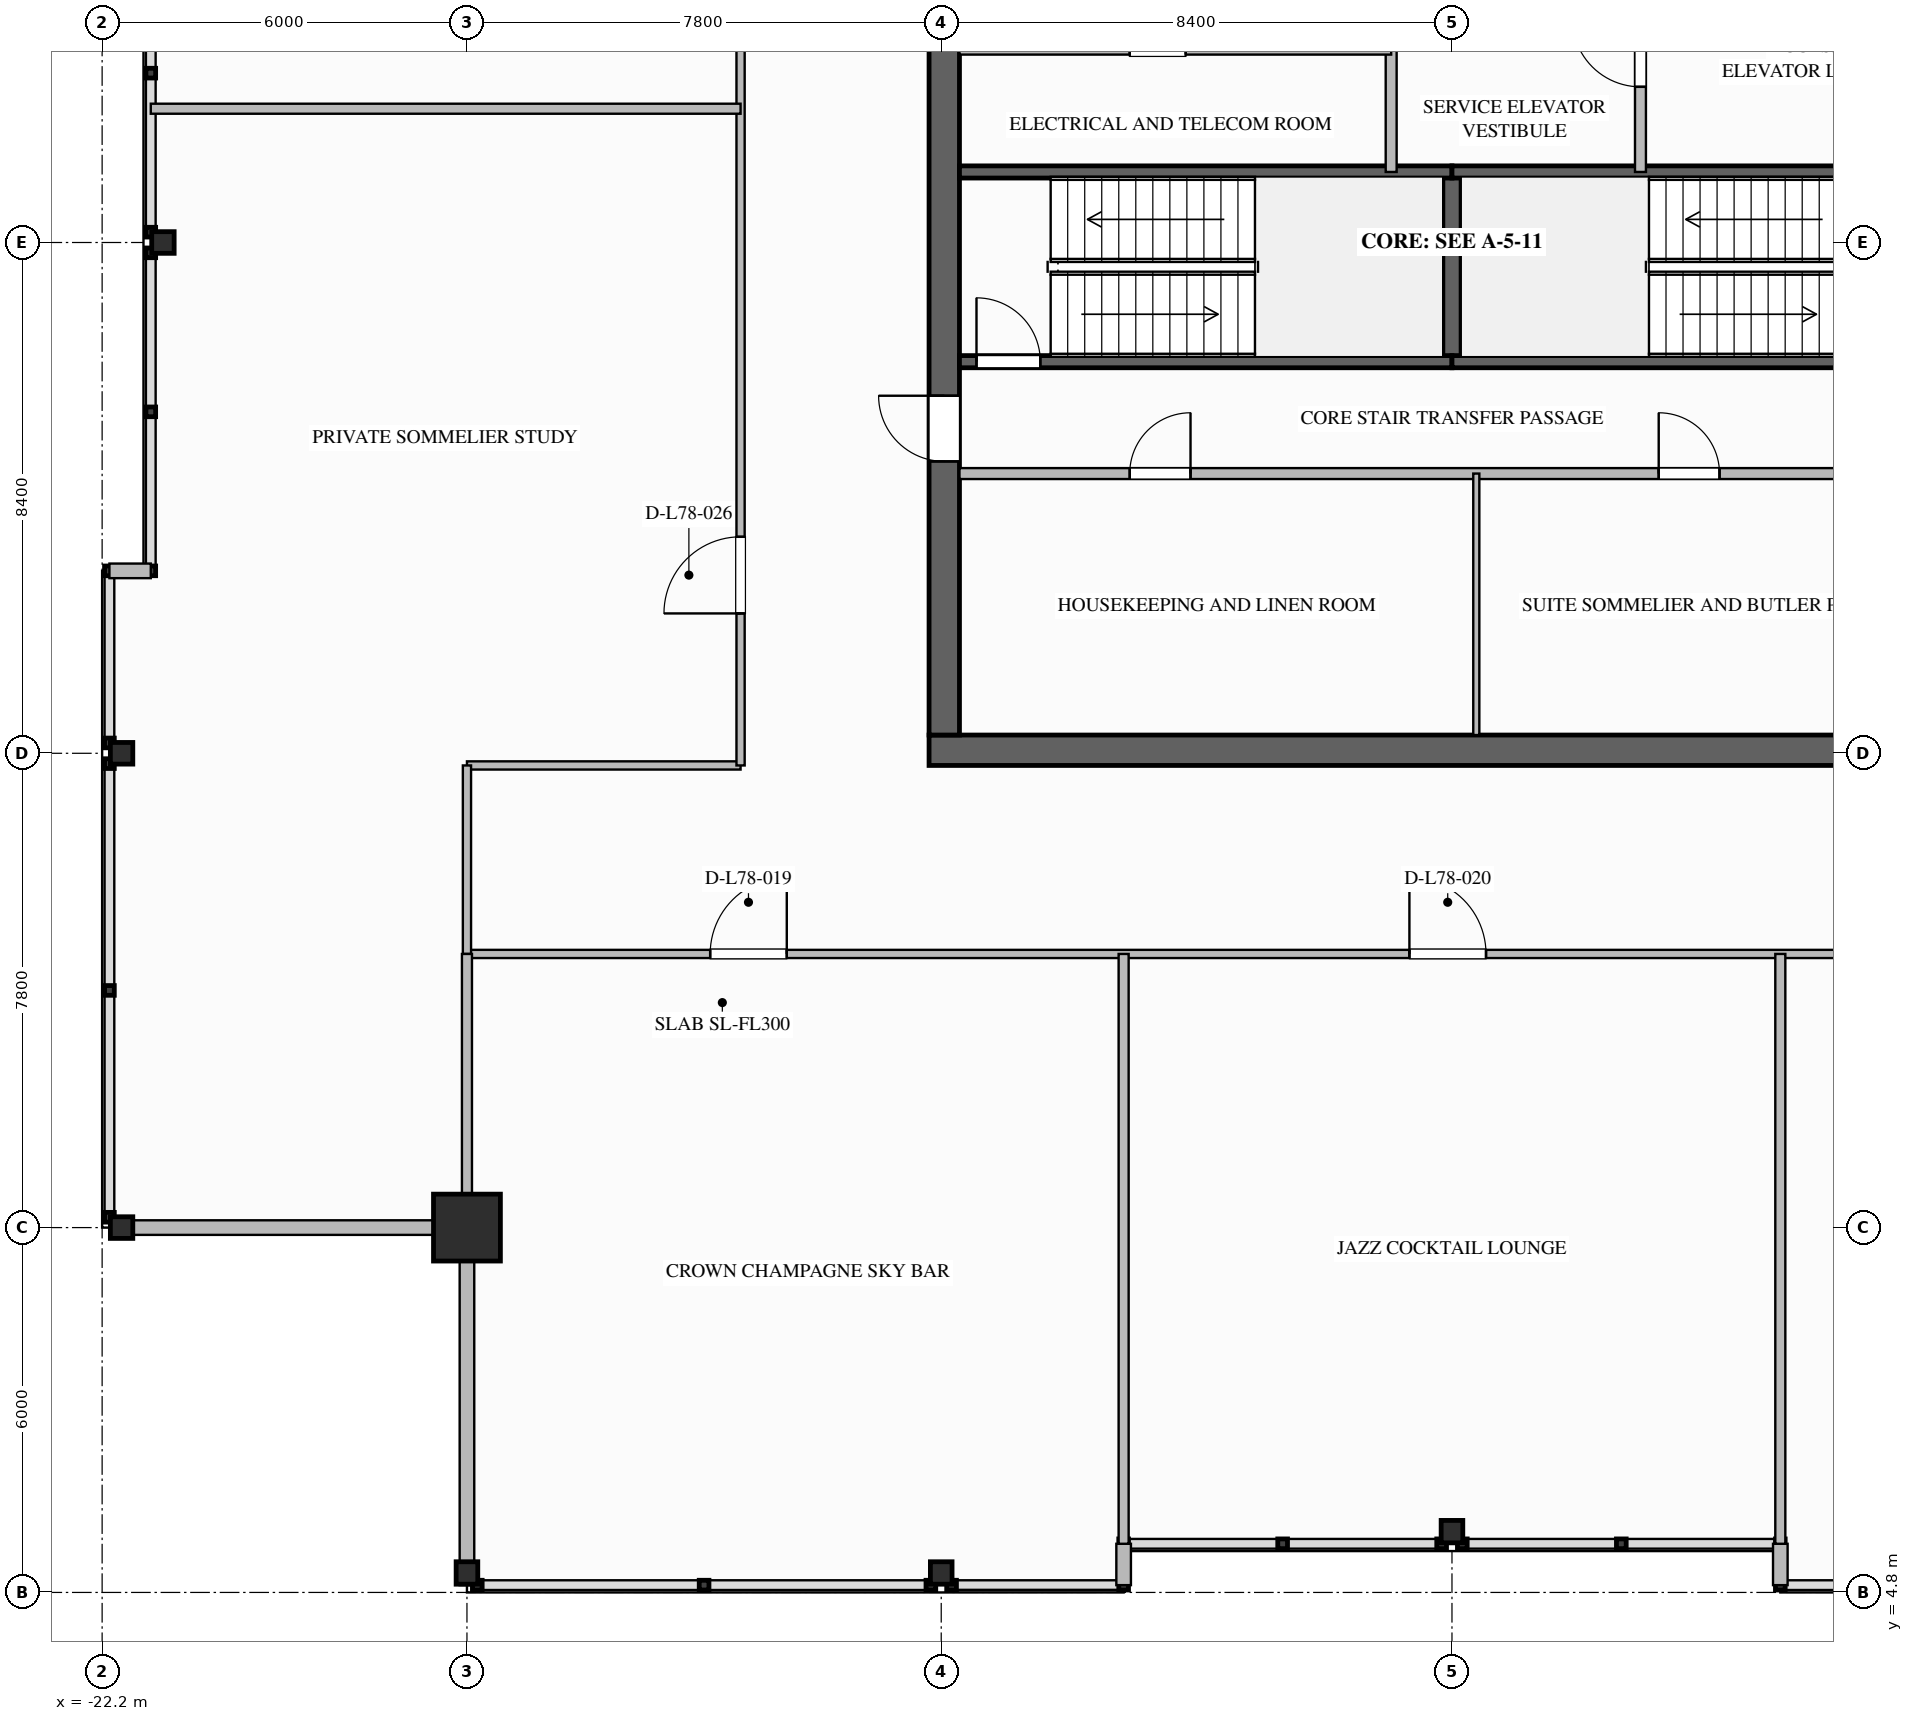
"""IFC4 building model, lengths in metres.
Left out: names, types, materials, properties, quantities, classifications, styles, units other than length and angle.
Written with IfcOpenShell. Run it as: python <this file> out.ifc"""

import sys

from ifc_helpers import new_model, si_unit, direction, frame, frame_2d, origin, origin_2d, place, context, subcontext, project, spatial, rectangle, i_section, extrude, element, fill, save


model = new_model("IFC4")
c1 = context("Model", 3, precision=1e-05, world=origin(), true_north=direction((0.0, 1.0)))
c2 = subcontext(c1, "Body", "Model", "MODEL_VIEW")
j1 = project(units=[si_unit("LENGTHUNIT", "METRE"), si_unit("PLANEANGLEUNIT", "RADIAN")], contexts=[c1])
p1 = place(None, origin())
s1 = spatial("IfcSite", under=j1, at=p1, CompositionType="ELEMENT")
p2 = place(p1, origin())
s2 = spatial("IfcBuilding", under=s1, at=p2, CompositionType="ELEMENT")
p3 = place(p2, frame((0.0, 0.0, 298.6)))
s3 = spatial("IfcBuildingStorey", under=s2, at=p3, CompositionType="ELEMENT", Elevation=298.6)
p4 = place(p3, frame((8.6, 18.65, 0.0), z_axis=(0.0, 0.0, 1.0), x_axis=(-1.0, 0.0, 0.0)))
e1 = element("IfcWall", 1, at=p4, inside=s3, PredefinedType="SHEAR", context=c2, shape_type="SweptSolid", body=[
    extrude(rectangle(XDim=17.2, YDim=0.5, at=frame_2d((8.6, 0.0))), origin(), (0.0, 0.0, 1.0), 4.4),
])
p5 = place(p3, frame((-8.35, 18.9, 0.0), z_axis=(0.0, 0.0, 1.0), x_axis=(0.0, 1.0, 0.0)))
e2 = element("IfcWall", 2, at=p5, inside=s3, PredefinedType="SHEAR", context=c2, shape_type="SweptSolid", body=[
    extrude(rectangle(XDim=16.2, YDim=0.5, at=frame_2d((8.1, 0.0))), origin(), (0.0, 0.0, 1.0), 4.4),
])
p6 = place(p5, frame((12.02, 0.0, 0.0)))
e3 = element("IfcOpeningElement", 3, at=p6, cuts=e2, PredefinedType="OPENING", context=c2, shape_type="SweptSolid", body=[
    extrude(rectangle(XDim=1.08, YDim=2.04, at=frame_2d((0.54, 1.02))), frame((0.0, 0.26, 0.0), z_axis=(0.0, -1.0, 0.0), x_axis=(1.0, 0.0, 0.0)), (0.0, 0.0, 1.0), 0.52),
])
p7 = place(p5, frame((4.5, 0.0, 0.0)))
e4 = element("IfcOpeningElement", 4, at=p7, cuts=e2, PredefinedType="OPENING", context=c2, shape_type="SweptSolid", body=[
    extrude(rectangle(XDim=1.08, YDim=2.04, at=frame_2d((0.54, 1.02))), frame((0.0, 0.26, 0.0), z_axis=(0.0, -1.0, 0.0), x_axis=(1.0, 0.0, 0.0)), (0.0, 0.0, 1.0), 0.52),
])
p8 = place(p3, frame((-16.2, 10.8, 0.0), z_axis=(0.0, 0.0, 1.0), x_axis=(1.0, 0.0, 0.0)))
e5 = element("IfcColumn", 5, at=p8, inside=s3, PredefinedType="COLUMN", context=c2, shape_type="SweptSolid", body=[
    extrude(rectangle(XDim=1.1, YDim=1.1, at=origin_2d()), origin(), (0.0, 0.0, 1.0), 4.4),
])
for number, where, z_axis, x_axis in (
    (6, (-21.88, 10.8, 0.0), (0.0, 0.0, 1.0), (1.0, 0.0, 0.0)),
    (7, (-21.88, 18.6, 0.0), (0.0, 0.0, 1.0), (1.0, 0.0, 0.0)),
    (8, (-21.2, 27.0, 0.0), (0.0, 0.0, 1.0), (1.0, 0.0, 0.0)),
    (9, (-16.2, 5.12, 0.0), (0.0, 0.0, 1.0), (0.0, 1.0, 0.0)),
    (10, (-8.4, 5.12, 0.0), (0.0, 0.0, 1.0), (0.0, 1.0, 0.0)),
    (11, (0.0, 5.8, 0.0), (0.0, 0.0, 1.0), (0.0, 1.0, 0.0)),
):
    element("IfcColumn", number, at=place(p3, frame(where, z_axis=z_axis, x_axis=x_axis)), inside=s3, PredefinedType="COLUMN", context=c2, shape_type="SweptSolid", body=[
        extrude(i_section(OverallWidth=0.369, OverallDepth=0.356, WebThickness=0.011, FlangeThickness=0.018, FilletRadius=0.025, at=origin_2d()), origin(), (0.0, 0.0, 1.0), 4.397),
    ])
for number, where, z_axis, x_axis in (
    (12, (-16.2, 4.92, 0.0), (0.0, 0.0, 1.0), (0.0, 1.0, 0.0)),
    (13, (-16.2, 10.8, 0.0), (0.0, 0.0, 1.0), (-1.0, 0.0, 0.0)),
):
    element("IfcWall", number, at=place(p3, frame(where, z_axis=z_axis, x_axis=x_axis)), inside=s3, PredefinedType="STANDARD", context=c2, shape_type="SweptSolid", body=[
        extrude(rectangle(XDim=5.88, YDim=0.24, at=frame_2d((2.94, 0.0))), origin(), (0.0, 0.0, 1.0), 3.439),
    ])
for number, where, z_axis, x_axis in (
    (14, (-22.08, 21.6, 0.0), (0.0, 0.0, 1.0), (1.0, 0.0, 0.0)),
    (15, (5.4, 4.92, 0.0), (0.0, 0.0, 1.0), (0.0, 1.0, 0.0)),
    (16, (-5.4, 5.6, 0.0), (0.0, 0.0, 1.0), (0.0, -1.0, 0.0)),
):
    element("IfcWall", number, at=place(p3, frame(where, z_axis=z_axis, x_axis=x_axis)), inside=s3, PredefinedType="STANDARD", context=c2, shape_type="SweptSolid", body=[
        extrude(rectangle(XDim=0.68, YDim=0.24, at=frame_2d((0.34, 0.0))), origin(), (0.0, 0.0, 1.0), 4.05),
    ])
p9 = place(p3, frame((0.0, 25.04, 0.0), z_axis=(0.0, 0.0, 1.0), x_axis=(0.0, 1.0, 0.0)))
e17 = element("IfcWall", 17, at=p9, inside=s3, PredefinedType="SOLIDWALL", context=c2, shape_type="SweptSolid", body=[
    extrude(rectangle(XDim=3.12, YDim=0.3, at=frame_2d((1.56, 0.0))), origin(), (0.0, 0.0, 1.0), 4.05),
])
p10 = place(p3, frame((-8.1, 25.04, 0.0), z_axis=(0.0, 0.0, 1.0), x_axis=(1.0, 0.0, 0.0)))
e18 = element("IfcWall", 18, at=p10, inside=s3, PredefinedType="SOLIDWALL", context=c2, shape_type="SweptSolid", body=[
    extrude(rectangle(XDim=8.1, YDim=0.2, at=frame_2d((4.05, 0.0))), origin(), (0.0, 0.0, 1.0), 4.05),
])
p11 = place(p10, frame((0.28, 0.0, 0.0)))
e19 = element("IfcOpeningElement", 19, at=p11, cuts=e18, PredefinedType="OPENING", context=c2, shape_type="SweptSolid", body=[
    extrude(rectangle(XDim=1.05, YDim=2.1, at=frame_2d((0.525, 1.05))), frame((0.0, 0.11, 0.0), z_axis=(0.0, -1.0, 0.0), x_axis=(1.0, 0.0, 0.0)), (0.0, 0.0, 1.0), 0.22),
])
for number, where, z_axis, x_axis in (
    (20, (-8.1, 28.16, 0.0), (0.0, 0.0, 1.0), (1.0, 0.0, 0.0)),
    (21, (0.0, 25.04, 0.0), (0.0, 0.0, 1.0), (1.0, 0.0, 0.0)),
):
    element("IfcWall", number, at=place(p3, frame(where, z_axis=z_axis, x_axis=x_axis)), inside=s3, PredefinedType="SOLIDWALL", context=c2, shape_type="SweptSolid", body=[
        extrude(rectangle(XDim=8.1, YDim=0.2, at=frame_2d((4.05, 0.0))), origin(), (0.0, 0.0, 1.0), 4.05),
    ])
p12 = place(p3, frame((8.1, 28.16, 0.0), z_axis=(0.0, 0.0, 1.0), x_axis=(-1.0, 0.0, 0.0)))
e22 = element("IfcWall", 22, at=p12, inside=s3, PredefinedType="SOLIDWALL", context=c2, shape_type="SweptSolid", body=[
    extrude(rectangle(XDim=8.1, YDim=0.2, at=frame_2d((4.05, 0.0))), origin(), (0.0, 0.0, 1.0), 4.05),
])
p13 = place(p12, frame((0.28, 0.0, 0.0)))
e23 = element("IfcOpeningElement", 23, at=p13, cuts=e22, PredefinedType="OPENING", context=c2, shape_type="SweptSolid", body=[
    extrude(rectangle(XDim=1.05, YDim=2.1, at=frame_2d((0.525, 1.05))), frame((0.0, 0.11, 0.0), z_axis=(0.0, -1.0, 0.0), x_axis=(1.0, 0.0, 0.0)), (0.0, 0.0, 1.0), 0.22),
])
p14 = place(p3, frame((3.1, 28.16, 0.0), z_axis=(0.0, 0.0, 1.0), x_axis=(0.0, 1.0, 0.0)))
e24 = element("IfcWall", 24, at=p14, inside=s3, PredefinedType="SOLIDWALL", context=c2, shape_type="SweptSolid", body=[
    extrude(rectangle(XDim=4.06, YDim=0.18, at=frame_2d((2.03, 0.0))), origin(), (0.0, 0.0, 1.0), 4.05),
])
p15 = place(p14, frame((1.4, 0.0, 0.0)))
e25 = element("IfcOpeningElement", 25, at=p15, cuts=e24, PredefinedType="OPENING", context=c2, shape_type="SweptSolid", body=[
    extrude(rectangle(XDim=1.12, YDim=2.1, at=frame_2d((0.56, 1.05))), frame((0.0, 0.1, 0.0), z_axis=(0.0, -1.0, 0.0), x_axis=(1.0, 0.0, 0.0)), (0.0, 0.0, 1.0), 0.2),
])
p16 = place(p3, frame((-1.0, 28.16, 0.0), z_axis=(0.0, 0.0, 1.0), x_axis=(0.0, 1.0, 0.0)))
e26 = element("IfcWall", 26, at=p16, inside=s3, PredefinedType="SOLIDWALL", context=c2, shape_type="SweptSolid", body=[
    extrude(rectangle(XDim=4.02, YDim=0.18, at=frame_2d((2.01, 0.0))), origin(), (0.0, 0.0, 1.0), 4.05),
])
p17 = place(p16, frame((2.49, 0.0, 0.0)))
e27 = element("IfcOpeningElement", 27, at=p17, cuts=e26, PredefinedType="OPENING", context=c2, shape_type="SweptSolid", body=[
    extrude(rectangle(XDim=1.0, YDim=2.1, at=frame_2d((0.5, 1.05))), frame((0.0, 0.1, 0.0), z_axis=(0.0, -1.0, 0.0), x_axis=(1.0, 0.0, 0.0)), (0.0, 0.0, 1.0), 0.2),
])
p18 = place(p3, frame((-8.1, 30.14, 0.0), z_axis=(0.0, 0.0, 1.0), x_axis=(1.0, 0.0, 0.0)))
e28 = element("IfcWall", 28, at=p18, inside=s3, PredefinedType="PARTITIONING", context=c2, shape_type="SweptSolid", body=[
    extrude(rectangle(XDim=7.1, YDim=0.1, at=frame_2d((3.55, 0.0))), origin(), (0.0, 0.0, 1.0), 4.05),
])
p19 = place(p18, frame((2.8, 0.0, 0.0)))
e29 = element("IfcOpeningElement", 29, at=p19, cuts=e28, PredefinedType="OPENING", context=c2, shape_type="SweptSolid", body=[
    extrude(rectangle(XDim=0.92, YDim=2.1, at=frame_2d((0.46, 1.05))), frame((0.0, 0.06, 0.0), z_axis=(0.0, -1.0, 0.0), x_axis=(1.0, 0.0, 0.0)), (0.0, 0.0, 1.0), 0.12),
])
p20 = place(p3, frame((-8.1, 23.2, 0.0), z_axis=(0.0, 0.0, 1.0), x_axis=(1.0, 0.0, 0.0)))
e30 = element("IfcWall", 30, at=p20, inside=s3, PredefinedType="SOLIDWALL", context=c2, shape_type="SweptSolid", body=[
    extrude(rectangle(XDim=16.2, YDim=0.18, at=frame_2d((8.1, 0.0))), origin(), (0.0, 0.0, 1.0), 4.05),
])
p21 = place(p20, frame((2.8, 0.0, 0.0)))
e31 = element("IfcOpeningElement", 31, at=p21, cuts=e30, PredefinedType="OPENING", context=c2, shape_type="SweptSolid", body=[
    extrude(rectangle(XDim=1.0, YDim=2.1, at=frame_2d((0.5, 1.05))), frame((0.0, 0.1, 0.0), z_axis=(0.0, -1.0, 0.0), x_axis=(1.0, 0.0, 0.0)), (0.0, 0.0, 1.0), 0.2),
])
p22 = place(p20, frame((11.5, 0.0, 0.0)))
e32 = element("IfcOpeningElement", 32, at=p22, cuts=e30, PredefinedType="OPENING", context=c2, shape_type="SweptSolid", body=[
    extrude(rectangle(XDim=1.0, YDim=2.1, at=frame_2d((0.5, 1.05))), frame((0.0, 0.1, 0.0), z_axis=(0.0, -1.0, 0.0), x_axis=(1.0, 0.0, 0.0)), (0.0, 0.0, 1.0), 0.2),
])
p23 = place(p3, frame((0.4, 18.9, 0.0), z_axis=(0.0, 0.0, 1.0), x_axis=(0.0, 1.0, 0.0)))
e33 = element("IfcWall", 33, at=p23, inside=s3, PredefinedType="PARTITIONING", context=c2, shape_type="SweptSolid", body=[
    extrude(rectangle(XDim=4.3, YDim=0.1, at=frame_2d((2.15, 0.0))), origin(), (0.0, 0.0, 1.0), 4.05),
])
p24 = place(p3, frame((-16.2, 15.3, 0.0), z_axis=(0.0, 0.0, 1.0), x_axis=(1.0, 0.0, 0.0)))
e34 = element("IfcWall", 34, at=p24, inside=s3, PredefinedType="PARTITIONING", context=c2, shape_type="SweptSolid", body=[
    extrude(rectangle(XDim=32.4, YDim=0.135, at=frame_2d((16.2, 0.0))), origin(), (0.0, 0.0, 1.0), 4.05),
])
p25 = place(p24, frame((4.0, 0.0, 0.0)))
e35 = element("IfcOpeningElement", 35, at=p25, cuts=e34, PredefinedType="OPENING", context=c2, shape_type="SweptSolid", body=[
    extrude(rectangle(XDim=1.26, YDim=2.2, at=frame_2d((0.63, 1.1))), frame((0.0, 0.077, 0.0), z_axis=(0.0, -1.0, 0.0), x_axis=(1.0, 0.0, 0.0)), (0.0, 0.0, 1.0), 0.155),
])
p26 = place(p24, frame((15.5, 0.0, 0.0)))
e36 = element("IfcOpeningElement", 36, at=p26, cuts=e34, PredefinedType="OPENING", context=c2, shape_type="SweptSolid", body=[
    extrude(rectangle(XDim=1.26, YDim=2.2, at=frame_2d((0.63, 1.1))), frame((0.0, 0.077, 0.0), z_axis=(0.0, -1.0, 0.0), x_axis=(1.0, 0.0, 0.0)), (0.0, 0.0, 1.0), 0.155),
])
p27 = place(p24, frame((26.0, 0.0, 0.0)))
e37 = element("IfcOpeningElement", 37, at=p27, cuts=e34, PredefinedType="OPENING", context=c2, shape_type="SweptSolid", body=[
    extrude(rectangle(XDim=1.26, YDim=2.2, at=frame_2d((0.63, 1.1))), frame((0.0, 0.077, 0.0), z_axis=(0.0, -1.0, 0.0), x_axis=(1.0, 0.0, 0.0)), (0.0, 0.0, 1.0), 0.155),
])
p28 = place(p3, frame((-16.2, 18.4, 0.0), z_axis=(0.0, 0.0, 1.0), x_axis=(1.0, 0.0, 0.0)))
e38 = element("IfcWall", 38, at=p28, inside=s3, PredefinedType="PARTITIONING", context=c2, shape_type="SweptSolid", body=[
    extrude(rectangle(XDim=4.5, YDim=0.135, at=frame_2d((2.25, 0.0))), origin(), (0.0, 0.0, 1.0), 3.427),
])
p29 = place(p3, frame((-11.7, 18.4, 0.0), z_axis=(0.0, 0.0, 1.0), x_axis=(0.0, 1.0, 0.0)))
e39 = element("IfcWall", 39, at=p29, inside=s3, PredefinedType="PARTITIONING", context=c2, shape_type="SweptSolid", body=[
    extrude(rectangle(XDim=17.2, YDim=0.135, at=frame_2d((8.6, 0.0))), origin(), (0.0, 0.0, 1.0), 4.05),
])
p30 = place(p29, frame((2.5, 0.0, 0.0)))
e40 = element("IfcOpeningElement", 40, at=p30, cuts=e39, PredefinedType="OPENING", context=c2, shape_type="SweptSolid", body=[
    extrude(rectangle(XDim=1.26, YDim=2.2, at=frame_2d((0.63, 1.1))), frame((0.0, 0.077, 0.0), z_axis=(0.0, -1.0, 0.0), x_axis=(1.0, 0.0, 0.0)), (0.0, 0.0, 1.0), 0.155),
])
p31 = place(p29, frame((12.0, 0.0, 0.0)))
e41 = element("IfcOpeningElement", 41, at=p31, cuts=e39, PredefinedType="OPENING", context=c2, shape_type="SweptSolid", body=[
    extrude(rectangle(XDim=1.26, YDim=2.2, at=frame_2d((0.63, 1.1))), frame((0.0, 0.077, 0.0), z_axis=(0.0, -1.0, 0.0), x_axis=(1.0, 0.0, 0.0)), (0.0, 0.0, 1.0), 0.155),
])
p32 = place(p3, frame((-16.2, 15.3, 0.0), z_axis=(0.0, 0.0, 1.0), x_axis=(0.0, 1.0, 0.0)))
e42 = element("IfcWall", 42, at=p32, inside=s3, PredefinedType="PARTITIONING", context=c2, shape_type="SweptSolid", body=[
    extrude(rectangle(XDim=3.1, YDim=0.135, at=frame_2d((1.55, 0.0))), origin(), (0.0, 0.0, 1.0), 3.424),
])
p33 = place(p3, frame((-16.2, 10.92, 0.0), z_axis=(0.0, 0.0, 1.0), x_axis=(0.0, 1.0, 0.0)))
e43 = element("IfcWall", 43, at=p33, inside=s3, PredefinedType="PARTITIONING", context=c2, shape_type="SweptSolid", body=[
    extrude(rectangle(XDim=4.38, YDim=0.165, at=frame_2d((2.19, 0.0))), origin(), (0.0, 0.0, 1.0), 3.424),
])
for number, where, z_axis, x_axis in (
    (44, (-5.4, 5.6, 0.0), (0.0, 0.0, 1.0), (0.0, 1.0, 0.0)),
    (45, (5.4, 5.6, 0.0), (0.0, 0.0, 1.0), (0.0, 1.0, 0.0)),
    (46, (-21.4, 29.2, 0.0), (0.0, 0.0, 1.0), (1.0, 0.0, 0.0)),
):
    element("IfcWall", number, at=place(p3, frame(where, z_axis=z_axis, x_axis=x_axis)), inside=s3, PredefinedType="PARTITIONING", context=c2, shape_type="SweptSolid", body=[
        extrude(rectangle(XDim=9.7, YDim=0.165, at=frame_2d((4.85, 0.0))), origin(), (0.0, 0.0, 1.0), 4.05),
    ])
p34 = place(p11, origin())
e47 = element("IfcDoor", 47, at=p34, inside=s3, OperationType="SINGLE_SWING_LEFT", PredefinedType="DOOR", context=c2, shape_type="SweptSolid", body=[
    extrude(rectangle(XDim=1.05, YDim=2.1, at=frame_2d((0.525, 1.05))), frame((0.0, 0.025, 0.0), z_axis=(0.0, -1.0, 0.0), x_axis=(1.0, 0.0, 0.0)), (0.0, 0.0, 1.0), 0.05),
])
fill(e19, e47)
p35 = place(p15, origin())
e48 = element("IfcDoor", 48, at=p35, inside=s3, OperationType="SINGLE_SWING_RIGHT", PredefinedType="DOOR", context=c2, shape_type="SweptSolid", body=[
    extrude(rectangle(XDim=1.12, YDim=2.1, at=frame_2d((0.56, 1.05))), frame((0.0, 0.025, 0.0), z_axis=(0.0, -1.0, 0.0), x_axis=(1.0, 0.0, 0.0)), (0.0, 0.0, 1.0), 0.05),
])
fill(e25, e48)
p36 = place(p19, origin())
e49 = element("IfcDoor", 49, at=p36, inside=s3, OperationType="SINGLE_SWING_LEFT", PredefinedType="DOOR", context=c2, shape_type="SweptSolid", body=[
    extrude(rectangle(XDim=0.92, YDim=2.1, at=frame_2d((0.46, 1.05))), frame((0.0, 0.025, 0.0), z_axis=(0.0, -1.0, 0.0), x_axis=(1.0, 0.0, 0.0)), (0.0, 0.0, 1.0), 0.05),
])
fill(e29, e49)
p37 = place(p7, origin())
e50 = element("IfcDoor", 50, at=p37, inside=s3, OperationType="SINGLE_SWING_RIGHT", PredefinedType="DOOR", context=c2, shape_type="SweptSolid", body=[
    extrude(rectangle(XDim=1.08, YDim=2.04, at=frame_2d((0.54, 1.02))), frame((0.0, 0.025, 0.0), z_axis=(0.0, -1.0, 0.0), x_axis=(1.0, 0.0, 0.0)), (0.0, 0.0, 1.0), 0.05),
])
fill(e4, e50)
p38 = place(p21, origin())
e51 = element("IfcDoor", 51, at=p38, inside=s3, OperationType="SINGLE_SWING_RIGHT", PredefinedType="DOOR", context=c2, shape_type="SweptSolid", body=[
    extrude(rectangle(XDim=1.0, YDim=2.1, at=frame_2d((0.5, 1.05))), frame((0.0, 0.025, 0.0), z_axis=(0.0, -1.0, 0.0), x_axis=(1.0, 0.0, 0.0)), (0.0, 0.0, 1.0), 0.05),
])
fill(e31, e51)
p39 = place(p22, origin())
e52 = element("IfcDoor", 52, at=p39, inside=s3, OperationType="SINGLE_SWING_LEFT", PredefinedType="DOOR", context=c2, shape_type="SweptSolid", body=[
    extrude(rectangle(XDim=1.0, YDim=2.1, at=frame_2d((0.5, 1.05))), frame((0.0, 0.025, 0.0), z_axis=(0.0, -1.0, 0.0), x_axis=(1.0, 0.0, 0.0)), (0.0, 0.0, 1.0), 0.05),
])
fill(e32, e52)
p40 = place(p25, origin())
e53 = element("IfcDoor", 53, at=p40, inside=s3, OperationType="SINGLE_SWING_RIGHT", PredefinedType="DOOR", context=c2, shape_type="SweptSolid", body=[
    extrude(rectangle(XDim=1.26, YDim=2.2, at=frame_2d((0.63, 1.1))), frame((0.0, 0.025, 0.0), z_axis=(0.0, -1.0, 0.0), x_axis=(1.0, 0.0, 0.0)), (0.0, 0.0, 1.0), 0.05),
])
fill(e35, e53)
p41 = place(p26, origin())
e54 = element("IfcDoor", 54, at=p41, inside=s3, OperationType="SINGLE_SWING_LEFT", PredefinedType="DOOR", context=c2, shape_type="SweptSolid", body=[
    extrude(rectangle(XDim=1.26, YDim=2.2, at=frame_2d((0.63, 1.1))), frame((0.0, 0.025, 0.0), z_axis=(0.0, -1.0, 0.0), x_axis=(1.0, 0.0, 0.0)), (0.0, 0.0, 1.0), 0.05),
])
fill(e36, e54)
p42 = place(p30, origin())
e55 = element("IfcDoor", 55, at=p42, inside=s3, OperationType="SINGLE_SWING_LEFT", PredefinedType="DOOR", context=c2, shape_type="SweptSolid", body=[
    extrude(rectangle(XDim=1.26, YDim=2.2, at=frame_2d((0.63, 1.1))), frame((0.0, 0.025, 0.0), z_axis=(0.0, -1.0, 0.0), x_axis=(1.0, 0.0, 0.0)), (0.0, 0.0, 1.0), 0.05),
])
fill(e40, e55)
save(model, sys.argv[1])
